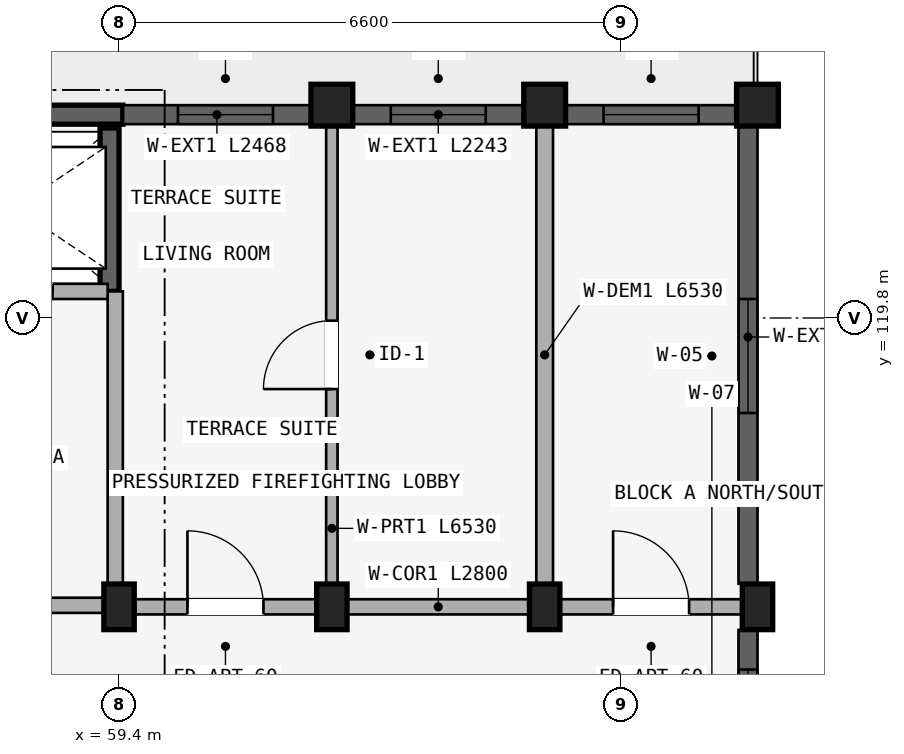
"""IFC4 building model, lengths in metres.
Left out: names, types, materials, properties, quantities, classifications, styles, units other than length and angle.
Written with IfcOpenShell. Run it as: python <this file> out.ifc"""

import sys

from ifc_helpers import new_model, si_unit, direction, frame, frame_2d, origin, origin_2d, place, context, subcontext, project, spatial, rectangle, extrude, element, fill, save


model = new_model("IFC4")
c1 = context("Model", 3, precision=1e-05, world=origin(), true_north=direction((0.0, 1.0)))
c2 = subcontext(c1, "Body", "Model", "MODEL_VIEW")
j1 = project(units=[si_unit("LENGTHUNIT", "METRE"), si_unit("PLANEANGLEUNIT", "RADIAN")], contexts=[c1])
p1 = place(None, origin())
s1 = spatial("IfcSite", under=j1, at=p1, CompositionType="ELEMENT")
p2 = place(p1, origin())
s2 = spatial("IfcBuilding", under=s1, at=p2, CompositionType="ELEMENT")
p3 = place(p2, frame((0.0, 0.0, 49.65)))
s3 = spatial("IfcBuildingStorey", under=s2, at=p3, CompositionType="ELEMENT", Elevation=49.65)
p4 = place(p3, frame((56.65, 122.475, 0.0), z_axis=(0.0, 0.0, 1.0), x_axis=(1.0, 0.0, 0.0)))
e1 = element("IfcWall", 1, at=p4, inside=s3, PredefinedType="SHEAR", context=c2, shape_type="SweptSolid", body=[
    extrude(rectangle(XDim=2.8, YDim=0.25, at=frame_2d((1.4, 0.0))), origin(), (0.0, 0.0, 1.0), 2.91),
])
p5 = place(p3, frame((59.275, 120.15, 0.0), z_axis=(0.0, 0.0, 1.0), x_axis=(0.0, 1.0, 0.0)))
e2 = element("IfcWall", 2, at=p5, inside=s3, PredefinedType="SHEAR", context=c2, shape_type="SweptSolid", body=[
    extrude(rectangle(XDim=2.15, YDim=0.25, at=frame_2d((1.075, 0.0))), origin(), (0.0, 0.0, 1.0), 2.91),
])
for number, where, z_axis, x_axis in (
    (3, (59.4, 116.0, 0.0), (0.0, 0.0, 1.0), (1.0, 0.0, 0.0)),
    (4, (62.2, 116.0, 0.0), (0.0, 0.0, 1.0), (1.0, 0.0, 0.0)),
):
    element("IfcColumn", number, at=place(p3, frame(where, z_axis=z_axis, x_axis=x_axis)), inside=s3, PredefinedType="COLUMN", context=c2, shape_type="SweptSolid", body=[
        extrude(rectangle(XDim=0.4, YDim=0.6, at=origin_2d()), origin(), (0.0, 0.0, 1.0), 2.91),
    ])
p6 = place(p3, frame((62.2, 122.6, 0.0), z_axis=(0.0, 0.0, 1.0), x_axis=(1.0, 0.0, 0.0)))
e5 = element("IfcColumn", 5, at=p6, inside=s3, PredefinedType="COLUMN", context=c2, shape_type="SweptSolid", body=[
    extrude(rectangle(XDim=0.55, YDim=0.55, at=origin_2d()), origin(), (0.0, 0.0, 1.0), 2.91),
])
p7 = place(p3, frame((65.0, 116.0, 0.0), z_axis=(0.0, 0.0, 1.0), x_axis=(1.0, 0.0, 0.0)))
e6 = element("IfcColumn", 6, at=p7, inside=s3, PredefinedType="COLUMN", context=c2, shape_type="SweptSolid", body=[
    extrude(rectangle(XDim=0.4, YDim=0.6, at=origin_2d()), origin(), (0.0, 0.0, 1.0), 2.91),
])
p8 = place(p3, frame((65.0, 122.6, 0.0), z_axis=(0.0, 0.0, 1.0), x_axis=(1.0, 0.0, 0.0)))
e7 = element("IfcColumn", 7, at=p8, inside=s3, PredefinedType="COLUMN", context=c2, shape_type="SweptSolid", body=[
    extrude(rectangle(XDim=0.55, YDim=0.55, at=origin_2d()), origin(), (0.0, 0.0, 1.0), 2.91),
])
p9 = place(p3, frame((67.8, 116.0, 0.0), z_axis=(0.0, 0.0, 1.0), x_axis=(1.0, 0.0, 0.0)))
e8 = element("IfcColumn", 8, at=p9, inside=s3, PredefinedType="COLUMN", context=c2, shape_type="SweptSolid", body=[
    extrude(rectangle(XDim=0.4, YDim=0.6, at=origin_2d()), origin(), (0.0, 0.0, 1.0), 2.91),
])
p10 = place(p3, frame((67.8, 122.6, 0.0), z_axis=(0.0, 0.0, 1.0), x_axis=(1.0, 0.0, 0.0)))
e9 = element("IfcColumn", 9, at=p10, inside=s3, PredefinedType="COLUMN", context=c2, shape_type="SweptSolid", body=[
    extrude(rectangle(XDim=0.55, YDim=0.55, at=origin_2d()), origin(), (0.0, 0.0, 1.0), 2.91),
])
p11 = place(p3, frame((53.7, 116.02, 0.0), z_axis=(0.0, 0.0, 1.0), x_axis=(1.0, 0.0, 0.0)))
e10 = element("IfcWall", 10, at=p11, inside=s3, PredefinedType="STANDARD", context=c2, shape_type="SweptSolid", body=[
    extrude(rectangle(XDim=5.65, YDim=0.2, at=frame_2d((2.825, 0.0))), origin(), (0.0, 0.0, 1.0), 2.352),
])
p12 = place(p11, frame((1.923, 0.0, 0.0)))
e11 = element("IfcOpeningElement", 11, at=p12, cuts=e10, PredefinedType="OPENING", context=c2, shape_type="SweptSolid", body=[
    extrude(rectangle(XDim=1.24, YDim=2.15, at=frame_2d((0.62, 1.075))), frame((0.0, 0.11, 0.0), z_axis=(0.0, -1.0, 0.0), x_axis=(1.0, 0.0, 0.0)), (0.0, 0.0, 1.0), 0.22),
])
p13 = place(p3, frame((59.35, 116.02, 0.0), z_axis=(0.0, 0.0, 1.0), x_axis=(0.0, 1.0, 0.0)))
e12 = element("IfcWall", 12, at=p13, inside=s3, PredefinedType="STANDARD", context=c2, shape_type="SweptSolid", body=[
    extrude(rectangle(XDim=4.13, YDim=0.2, at=frame_2d((2.065, 0.0))), origin(), (0.0, 0.0, 1.0), 2.352),
])
p14 = place(p3, frame((56.7, 120.15, 0.0), z_axis=(0.0, 0.0, 1.0), x_axis=(1.0, 0.0, 0.0)))
e13 = element("IfcWall", 13, at=p14, inside=s3, PredefinedType="STANDARD", context=c2, shape_type="SweptSolid", body=[
    extrude(rectangle(XDim=2.55, YDim=0.2, at=frame_2d((1.275, 0.0))), origin(), (0.0, 0.0, 1.0), 2.91),
])
p15 = place(p14, frame((0.725, 0.0, 0.0)))
e14 = element("IfcOpeningElement", 14, at=p15, cuts=e13, PredefinedType="OPENING", context=c2, shape_type="SweptSolid", body=[
    extrude(rectangle(XDim=1.1, YDim=2.15, at=frame_2d((0.55, 1.075))), frame((0.0, 0.11, 0.0), z_axis=(0.0, -1.0, 0.0), x_axis=(1.0, 0.0, 0.0)), (0.0, 0.0, 1.0), 0.22),
])
p16 = place(p3, frame((59.4, 116.0, 0.0), z_axis=(0.0, 0.0, 1.0), x_axis=(1.0, 0.0, 0.0)))
e15 = element("IfcWall", 15, at=p16, inside=s3, PredefinedType="STANDARD", context=c2, shape_type="SweptSolid", body=[
    extrude(rectangle(XDim=2.8, YDim=0.2, at=frame_2d((1.4, 0.0))), origin(), (0.0, 0.0, 1.0), 2.352),
])
p17 = place(p16, frame((0.9, 0.0, 0.0)))
e16 = element("IfcOpeningElement", 16, at=p17, cuts=e15, PredefinedType="OPENING", context=c2, shape_type="SweptSolid", body=[
    extrude(rectangle(XDim=1.0, YDim=2.15, at=frame_2d((0.5, 1.075))), frame((0.0, 0.11, 0.0), z_axis=(0.0, -1.0, 0.0), x_axis=(1.0, 0.0, 0.0)), (0.0, 0.0, 1.0), 0.22),
])
p18 = place(p3, frame((62.2, 116.0, 0.0), z_axis=(0.0, 0.0, 1.0), x_axis=(1.0, 0.0, 0.0)))
e17 = element("IfcWall", 17, at=p18, inside=s3, PredefinedType="STANDARD", context=c2, shape_type="SweptSolid", body=[
    extrude(rectangle(XDim=2.8, YDim=0.2, at=frame_2d((1.4, 0.0))), origin(), (0.0, 0.0, 1.0), 2.352),
])
p19 = place(p3, frame((65.0, 116.0, 0.0), z_axis=(0.0, 0.0, 1.0), x_axis=(1.0, 0.0, 0.0)))
e18 = element("IfcWall", 18, at=p19, inside=s3, PredefinedType="STANDARD", context=c2, shape_type="SweptSolid", body=[
    extrude(rectangle(XDim=2.8, YDim=0.2, at=frame_2d((1.4, 0.0))), origin(), (0.0, 0.0, 1.0), 2.352),
])
p20 = place(p19, frame((0.9, 0.0, 0.0)))
e19 = element("IfcOpeningElement", 19, at=p20, cuts=e18, PredefinedType="OPENING", context=c2, shape_type="SweptSolid", body=[
    extrude(rectangle(XDim=1.0, YDim=2.15, at=frame_2d((0.5, 1.075))), frame((0.0, 0.11, 0.0), z_axis=(0.0, -1.0, 0.0), x_axis=(1.0, 0.0, 0.0)), (0.0, 0.0, 1.0), 0.22),
])
p21 = place(p3, frame((62.2, 116.05, 0.0), z_axis=(0.0, 0.0, 1.0), x_axis=(0.0, 1.0, 0.0)))
e20 = element("IfcWall", 20, at=p21, inside=s3, PredefinedType="PARTITIONING", context=c2, shape_type="SweptSolid", body=[
    extrude(rectangle(XDim=6.53, YDim=0.15, at=frame_2d((3.265, 0.0))), origin(), (0.0, 0.0, 1.0), 2.352),
])
p22 = place(p21, frame((2.815, 0.0, 0.0)))
e21 = element("IfcOpeningElement", 21, at=p22, cuts=e20, PredefinedType="OPENING", context=c2, shape_type="SweptSolid", body=[
    extrude(rectangle(XDim=0.9, YDim=2.1, at=frame_2d((0.45, 1.05))), frame((0.0, 0.085, 0.0), z_axis=(0.0, -1.0, 0.0), x_axis=(1.0, 0.0, 0.0)), (0.0, 0.0, 1.0), 0.17),
])
p23 = place(p3, frame((65.0, 116.05, 0.0), z_axis=(0.0, 0.0, 1.0), x_axis=(0.0, 1.0, 0.0)))
e22 = element("IfcWall", 22, at=p23, inside=s3, PredefinedType="STANDARD", context=c2, shape_type="SweptSolid", body=[
    extrude(rectangle(XDim=6.53, YDim=0.22, at=frame_2d((3.265, 0.0))), origin(), (0.0, 0.0, 1.0), 2.352),
])
p24 = place(p3, frame((59.454, 122.475, 0.0), z_axis=(0.0, 0.0, 1.0), x_axis=(1.0, 0.0, 0.0)))
e23 = element("IfcWall", 23, at=p24, inside=s3, PredefinedType="STANDARD", context=c2, shape_type="SweptSolid", body=[
    extrude(rectangle(XDim=2.468, YDim=0.25, at=frame_2d((1.234, 0.0))), origin(), (0.0, 0.0, 1.0), 2.452),
])
p25 = place(p24, frame((0.721, 0.0, 0.702)))
e24 = element("IfcOpeningElement", 24, at=p25, cuts=e23, PredefinedType="OPENING", context=c2, shape_type="SweptSolid", body=[
    extrude(rectangle(XDim=1.25, YDim=1.55, at=frame_2d((0.625, 0.775))), frame((0.0, 0.135, 0.0), z_axis=(0.0, -1.0, 0.0), x_axis=(1.0, 0.0, 0.0)), (0.0, 0.0, 1.0), 0.27),
])
p26 = place(p3, frame((62.479, 122.475, 0.0), z_axis=(0.0, 0.0, 1.0), x_axis=(1.0, 0.0, 0.0)))
e25 = element("IfcWall", 25, at=p26, inside=s3, PredefinedType="STANDARD", context=c2, shape_type="SweptSolid", body=[
    extrude(rectangle(XDim=2.243, YDim=0.25, at=frame_2d((1.122, 0.0))), origin(), (0.0, 0.0, 1.0), 2.452),
])
p27 = place(p26, frame((0.497, 0.0, 0.702)))
e26 = element("IfcOpeningElement", 26, at=p27, cuts=e25, PredefinedType="OPENING", context=c2, shape_type="SweptSolid", body=[
    extrude(rectangle(XDim=1.25, YDim=1.55, at=frame_2d((0.625, 0.775))), frame((0.0, 0.135, 0.0), z_axis=(0.0, -1.0, 0.0), x_axis=(1.0, 0.0, 0.0)), (0.0, 0.0, 1.0), 0.27),
])
p28 = place(p3, frame((65.279, 122.475, 0.0), z_axis=(0.0, 0.0, 1.0), x_axis=(1.0, 0.0, 0.0)))
e27 = element("IfcWall", 27, at=p28, inside=s3, PredefinedType="STANDARD", context=c2, shape_type="SweptSolid", body=[
    extrude(rectangle(XDim=2.243, YDim=0.25, at=frame_2d((1.122, 0.0))), origin(), (0.0, 0.0, 1.0), 2.452),
])
p29 = place(p28, frame((0.497, 0.0, 0.702)))
e28 = element("IfcOpeningElement", 28, at=p29, cuts=e27, PredefinedType="OPENING", context=c2, shape_type="SweptSolid", body=[
    extrude(rectangle(XDim=1.25, YDim=1.55, at=frame_2d((0.625, 0.775))), frame((0.0, 0.135, 0.0), z_axis=(0.0, -1.0, 0.0), x_axis=(1.0, 0.0, 0.0)), (0.0, 0.0, 1.0), 0.27),
])
p30 = place(p3, frame((67.675, 113.904, 0.0), z_axis=(0.0, 0.0, 1.0), x_axis=(0.0, 1.0, 0.0)))
e29 = element("IfcWall", 29, at=p30, inside=s3, PredefinedType="STANDARD", context=c2, shape_type="SweptSolid", body=[
    extrude(rectangle(XDim=1.793, YDim=0.25, at=frame_2d((0.896, 0.0))), origin(), (0.0, 0.0, 1.0), 2.352),
])
p31 = place(p30, frame((0.521, 0.0, 0.88)))
e30 = element("IfcOpeningElement", 30, at=p31, cuts=e29, PredefinedType="OPENING", context=c2, shape_type="SweptSolid", body=[
    extrude(rectangle(XDim=0.75, YDim=1.05, at=frame_2d((0.375, 0.525))), frame((0.0, 0.135, 0.0), z_axis=(0.0, -1.0, 0.0), x_axis=(1.0, 0.0, 0.0)), (0.0, 0.0, 1.0), 0.27),
])
p32 = place(p3, frame((67.675, 116.303, 0.0), z_axis=(0.0, 0.0, 1.0), x_axis=(0.0, 1.0, 0.0)))
e31 = element("IfcWall", 31, at=p32, inside=s3, PredefinedType="STANDARD", context=c2, shape_type="SweptSolid", body=[
    extrude(rectangle(XDim=6.018, YDim=0.25, at=frame_2d((3.009, 0.0))), origin(), (0.0, 0.0, 1.0), 2.46),
])
p33 = place(p32, frame((2.247, 0.0, 0.61)))
e32 = element("IfcOpeningElement", 32, at=p33, cuts=e31, PredefinedType="OPENING", context=c2, shape_type="SweptSolid", body=[
    extrude(rectangle(XDim=1.5, YDim=1.65, at=frame_2d((0.75, 0.825))), frame((0.0, 0.135, 0.0), z_axis=(0.0, -1.0, 0.0), x_axis=(1.0, 0.0, 0.0)), (0.0, 0.0, 1.0), 0.27),
])
p34 = place(p25, origin())
e33 = element("IfcWindow", 33, at=p34, inside=s3, PartitioningType="SINGLE_PANEL", PredefinedType="WINDOW", context=c2, shape_type="SweptSolid", body=[
    extrude(rectangle(XDim=1.25, YDim=1.55, at=frame_2d((0.625, 0.775))), frame((0.0, 0.03, 0.0), z_axis=(0.0, -1.0, 0.0), x_axis=(1.0, 0.0, 0.0)), (0.0, 0.0, 1.0), 0.06),
])
fill(e24, e33)
p35 = place(p27, origin())
e34 = element("IfcWindow", 34, at=p35, inside=s3, PartitioningType="SINGLE_PANEL", PredefinedType="WINDOW", context=c2, shape_type="SweptSolid", body=[
    extrude(rectangle(XDim=1.25, YDim=1.55, at=frame_2d((0.625, 0.775))), frame((0.0, 0.03, 0.0), z_axis=(0.0, -1.0, 0.0), x_axis=(1.0, 0.0, 0.0)), (0.0, 0.0, 1.0), 0.06),
])
fill(e26, e34)
p36 = place(p29, origin())
e35 = element("IfcWindow", 35, at=p36, inside=s3, PartitioningType="SINGLE_PANEL", PredefinedType="WINDOW", context=c2, shape_type="SweptSolid", body=[
    extrude(rectangle(XDim=1.25, YDim=1.55, at=frame_2d((0.625, 0.775))), frame((0.0, 0.03, 0.0), z_axis=(0.0, -1.0, 0.0), x_axis=(1.0, 0.0, 0.0)), (0.0, 0.0, 1.0), 0.06),
])
fill(e28, e35)
p37 = place(p31, origin())
e36 = element("IfcWindow", 36, at=p37, inside=s3, PartitioningType="SINGLE_PANEL", PredefinedType="WINDOW", context=c2, shape_type="SweptSolid", body=[
    extrude(rectangle(XDim=0.75, YDim=1.05, at=frame_2d((0.375, 0.525))), frame((0.0, 0.03, 0.0), z_axis=(0.0, -1.0, 0.0), x_axis=(1.0, 0.0, 0.0)), (0.0, 0.0, 1.0), 0.06),
])
fill(e30, e36)
p38 = place(p33, origin())
e37 = element("IfcWindow", 37, at=p38, inside=s3, PartitioningType="DOUBLE_PANEL_VERTICAL", PredefinedType="WINDOW", context=c2, shape_type="SweptSolid", body=[
    extrude(rectangle(XDim=1.5, YDim=1.65, at=frame_2d((0.75, 0.825))), frame((0.0, 0.03, 0.0), z_axis=(0.0, -1.0, 0.0), x_axis=(1.0, 0.0, 0.0)), (0.0, 0.0, 1.0), 0.06),
])
fill(e32, e37)
p39 = place(p15, origin())
e38 = element("IfcDoor", 38, at=p39, inside=s3, OperationType="SLIDING_TO_LEFT", PredefinedType="DOOR", context=c2, shape_type="SweptSolid", body=[
    extrude(rectangle(XDim=1.1, YDim=2.15, at=frame_2d((0.55, 1.075))), frame((0.0, 0.025, 0.0), z_axis=(0.0, -1.0, 0.0), x_axis=(1.0, 0.0, 0.0)), (0.0, 0.0, 1.0), 0.05),
])
fill(e14, e38)
p40 = place(p17, origin())
e39 = element("IfcDoor", 39, at=p40, inside=s3, OperationType="SINGLE_SWING_LEFT", PredefinedType="DOOR", context=c2, shape_type="SweptSolid", body=[
    extrude(rectangle(XDim=1.0, YDim=2.15, at=frame_2d((0.5, 1.075))), frame((0.0, 0.025, 0.0), z_axis=(0.0, -1.0, 0.0), x_axis=(1.0, 0.0, 0.0)), (0.0, 0.0, 1.0), 0.05),
])
fill(e16, e39)
p41 = place(p20, origin())
e40 = element("IfcDoor", 40, at=p41, inside=s3, OperationType="SINGLE_SWING_LEFT", PredefinedType="DOOR", context=c2, shape_type="SweptSolid", body=[
    extrude(rectangle(XDim=1.0, YDim=2.15, at=frame_2d((0.5, 1.075))), frame((0.0, 0.025, 0.0), z_axis=(0.0, -1.0, 0.0), x_axis=(1.0, 0.0, 0.0)), (0.0, 0.0, 1.0), 0.05),
])
fill(e19, e40)
p42 = place(p22, origin())
e41 = element("IfcDoor", 41, at=p42, inside=s3, OperationType="SINGLE_SWING_LEFT", PredefinedType="DOOR", context=c2, shape_type="SweptSolid", body=[
    extrude(rectangle(XDim=0.9, YDim=2.1, at=frame_2d((0.45, 1.05))), frame((0.0, 0.025, 0.0), z_axis=(0.0, -1.0, 0.0), x_axis=(1.0, 0.0, 0.0)), (0.0, 0.0, 1.0), 0.05),
])
fill(e21, e41)
save(model, sys.argv[1])
